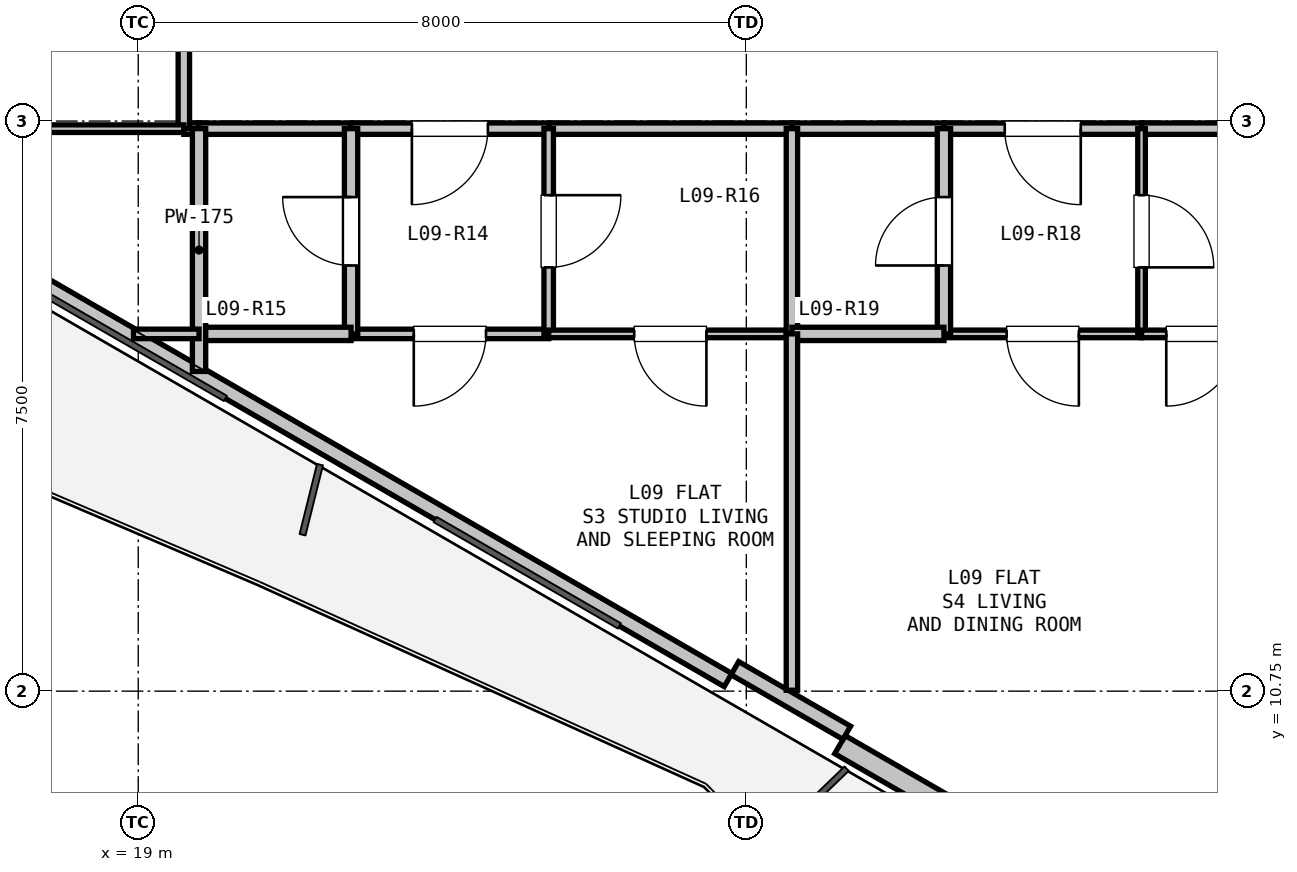
"""IFC4 building model, lengths in metres.
Left out: names, types, materials, properties, quantities, classifications, styles, units other than length and angle.
Written with IfcOpenShell. Run it as: python <this file> out.ifc"""

import sys

from ifc_helpers import new_model, si_unit, direction, frame, frame_2d, origin, place, context, subcontext, project, spatial, rectangle, extrude, element, fill, save


model = new_model("IFC4")
c1 = context("Model", 3, precision=1e-05, world=origin(), true_north=direction((0.0, 1.0)))
c2 = subcontext(c1, "Body", "Model", "MODEL_VIEW")
j1 = project(units=[si_unit("LENGTHUNIT", "METRE"), si_unit("PLANEANGLEUNIT", "RADIAN")], contexts=[c1])
p1 = place(None, origin())
s1 = spatial("IfcSite", under=j1, at=p1, CompositionType="ELEMENT")
p2 = place(p1, origin())
s2 = spatial("IfcBuilding", under=s1, at=p2, CompositionType="ELEMENT")
p3 = place(p2, frame((0.0, 0.0, 35.7)))
s3 = spatial("IfcBuildingStorey", under=s2, at=p3, CompositionType="ELEMENT", Elevation=35.7)
p4 = place(p3, frame((39.207, 3.71, 0.0), z_axis=(0.0, 0.0, 1.0), x_axis=(-0.86603192154, 0.499988710747, 0.0)))
e1 = element("IfcWall", 1, at=p4, inside=s3, PredefinedType="SOLIDWALL", context=c2, shape_type="SweptSolid", body=[
    extrude(rectangle(XDim=12.673, YDim=0.275, at=frame_2d((6.336, 0.0))), origin(), (0.0, 0.0, 1.0), 2.66),
])
p5 = place(p4, frame((8.136, 0.0, 0.0)))
e2 = element("IfcOpeningElement", 2, at=p5, cuts=e1, PredefinedType="OPENING", context=c2, shape_type="SweptSolid", body=[
    extrude(rectangle(XDim=1.0, YDim=2.1, at=frame_2d((0.5, 1.05))), frame((0.0, 0.147, 0.0), z_axis=(0.0, -1.0, 0.0), x_axis=(1.0, 0.0, 0.0)), (0.0, 0.0, 1.0), 0.295),
])
p6 = place(p4, frame((2.971, 0.0, 0.9)))
e3 = element("IfcOpeningElement", 3, at=p6, cuts=e1, PredefinedType="OPENING", context=c2, shape_type="SweptSolid", body=[
    extrude(rectangle(XDim=1.2, YDim=1.4, at=frame_2d((0.6, 0.7))), frame((0.0, 0.147, 0.0), z_axis=(0.0, -1.0, 0.0), x_axis=(1.0, 0.0, 0.0)), (0.0, 0.0, 1.0), 0.295),
])
p7 = place(p3, frame((26.76, 10.896, 0.0), z_axis=(0.0, 0.0, 1.0), x_axis=(-0.866027351828, 0.499996625875, 0.0)))
e4 = element("IfcWall", 4, at=p7, inside=s3, PredefinedType="PARAPET", context=c2, shape_type="SweptSolid", body=[
    extrude(rectangle(XDim=11.973, YDim=0.2, at=frame_2d((5.987, 0.0))), origin(), (0.0, 0.0, 1.0), 0.2),
])
p8 = place(p3, frame((28.322, 10.202, 0.0), z_axis=(0.0, 0.0, 1.0), x_axis=(-0.86605165483, 0.499954529098, 0.0)))
e5 = element("IfcWall", 5, at=p8, inside=s3, PredefinedType="PARAPET", context=c2, shape_type="SweptSolid", body=[
    extrude(rectangle(XDim=1.7, YDim=0.2, at=frame_2d((0.85, 0.0))), origin(), (0.0, 0.0, 1.0), 2.66),
])
p9 = place(p3, frame((35.8, 18.15, 0.0), z_axis=(0.0, 0.0, 1.0), x_axis=(-1.0, 0.0, 0.0)))
e6 = element("IfcWall", 6, at=p9, inside=s3, PredefinedType="PARTITIONING", context=c2, shape_type="SweptSolid", body=[
    extrude(rectangle(XDim=3.6, YDim=0.15, at=frame_2d((1.8, 0.0))), origin(), (0.0, 0.0, 1.0), 3.04),
])
p10 = place(p3, frame((32.2, 18.15, 0.0), z_axis=(0.0, 0.0, 1.0), x_axis=(-1.0, 0.0, 0.0)))
e7 = element("IfcWall", 7, at=p10, inside=s3, PredefinedType="PARTITIONING", context=c2, shape_type="SweptSolid", body=[
    extrude(rectangle(XDim=2.6, YDim=0.15, at=frame_2d((1.3, 0.0))), origin(), (0.0, 0.0, 1.0), 3.04),
])
p11 = place(p10, frame((0.8, 0.0, 0.0)))
e8 = element("IfcOpeningElement", 8, at=p11, cuts=e7, PredefinedType="OPENING", context=c2, shape_type="SweptSolid", body=[
    extrude(rectangle(XDim=1.0, YDim=2.15, at=frame_2d((0.5, 1.075))), frame((0.0, 0.085, 0.0), z_axis=(0.0, -1.0, 0.0), x_axis=(1.0, 0.0, 0.0)), (0.0, 0.0, 1.0), 0.17),
])
p12 = place(p3, frame((29.6, 18.15, 0.0), z_axis=(0.0, 0.0, 1.0), x_axis=(-1.0, 0.0, 0.0)))
e9 = element("IfcWall", 9, at=p12, inside=s3, PredefinedType="PARTITIONING", context=c2, shape_type="SweptSolid", body=[
    extrude(rectangle(XDim=2.0, YDim=0.15, at=frame_2d((1.0, 0.0))), origin(), (0.0, 0.0, 1.0), 3.04),
])
p13 = place(p3, frame((27.6, 18.15, 0.0), z_axis=(0.0, 0.0, 1.0), x_axis=(-1.0, 0.0, 0.0)))
e10 = element("IfcWall", 10, at=p13, inside=s3, PredefinedType="PARTITIONING", context=c2, shape_type="SweptSolid", body=[
    extrude(rectangle(XDim=3.2, YDim=0.15, at=frame_2d((1.6, 0.0))), origin(), (0.0, 0.0, 1.0), 3.04),
])
p14 = place(p3, frame((24.4, 18.15, 0.0), z_axis=(0.0, 0.0, 1.0), x_axis=(-1.0, 0.0, 0.0)))
e11 = element("IfcWall", 11, at=p14, inside=s3, PredefinedType="PARTITIONING", context=c2, shape_type="SweptSolid", body=[
    extrude(rectangle(XDim=2.6, YDim=0.15, at=frame_2d((1.3, 0.0))), origin(), (0.0, 0.0, 1.0), 2.338),
])
p15 = place(p14, frame((0.8, 0.0, 0.0)))
e12 = element("IfcOpeningElement", 12, at=p15, cuts=e11, PredefinedType="OPENING", context=c2, shape_type="SweptSolid", body=[
    extrude(rectangle(XDim=1.0, YDim=2.15, at=frame_2d((0.5, 1.075))), frame((0.0, 0.085, 0.0), z_axis=(0.0, -1.0, 0.0), x_axis=(1.0, 0.0, 0.0)), (0.0, 0.0, 1.0), 0.17),
])
p16 = place(p3, frame((21.8, 18.15, 0.0), z_axis=(0.0, 0.0, 1.0), x_axis=(-1.0, 0.0, 0.0)))
e13 = element("IfcWall", 13, at=p16, inside=s3, PredefinedType="PARTITIONING", context=c2, shape_type="SweptSolid", body=[
    extrude(rectangle(XDim=2.0, YDim=0.15, at=frame_2d((1.0, 0.0))), origin(), (0.0, 0.0, 1.0), 3.04),
])
p17 = place(p3, frame((19.8, 18.15, 0.0), z_axis=(0.0, 0.0, 1.0), x_axis=(-1.0, 0.0, 0.0)))
e14 = element("IfcWall", 14, at=p17, inside=s3, PredefinedType="PARTITIONING", context=c2, shape_type="SweptSolid", body=[
    extrude(rectangle(XDim=0.2, YDim=0.15, at=frame_2d((0.1, 0.0))), origin(), (0.0, 0.0, 1.0), 3.04),
])
p18 = place(p3, frame((19.6, 18.15, 0.0), z_axis=(0.0, 0.0, 1.0), x_axis=(0.0, 1.0, 0.0)))
e15 = element("IfcWall", 15, at=p18, inside=s3, PredefinedType="PARTITIONING", context=c2, shape_type="SweptSolid", body=[
    extrude(rectangle(XDim=3.9, YDim=0.15, at=frame_2d((1.95, 0.0))), origin(), (0.0, 0.0, 1.0), 2.338),
])
p19 = place(p3, frame((24.4, 15.45, 0.0), z_axis=(0.0, 0.0, 1.0), x_axis=(-1.0, 0.0, 0.0)))
e16 = element("IfcWall", 16, at=p19, inside=s3, PredefinedType="PARTITIONING", context=c2, shape_type="SweptSolid", body=[
    extrude(rectangle(XDim=2.6, YDim=0.125, at=frame_2d((1.3, 0.0))), origin(), (0.0, 0.0, 1.0), 3.04),
])
p20 = place(p19, frame((0.825, 0.0, 0.0)))
e17 = element("IfcOpeningElement", 17, at=p20, cuts=e16, PredefinedType="OPENING", context=c2, shape_type="SweptSolid", body=[
    extrude(rectangle(XDim=0.95, YDim=2.1, at=frame_2d((0.475, 1.05))), frame((0.0, 0.073, 0.0), z_axis=(0.0, -1.0, 0.0), x_axis=(1.0, 0.0, 0.0)), (0.0, 0.0, 1.0), 0.145),
])
p21 = place(p3, frame((21.8, 15.45, 0.0), z_axis=(0.0, 0.0, 1.0), x_axis=(0.0, 1.0, 0.0)))
e18 = element("IfcWall", 18, at=p21, inside=s3, PredefinedType="PLUMBINGWALL", context=c2, shape_type="SweptSolid", body=[
    extrude(rectangle(XDim=2.7, YDim=0.175, at=frame_2d((1.35, 0.0))), origin(), (0.0, 0.0, 1.0), 3.04),
])
p22 = place(p21, frame((0.9, 0.0, 0.0)))
e19 = element("IfcOpeningElement", 19, at=p22, cuts=e18, PredefinedType="OPENING", context=c2, shape_type="SweptSolid", body=[
    extrude(rectangle(XDim=0.9, YDim=2.1, at=frame_2d((0.45, 1.05))), frame((0.0, 0.097, 0.0), z_axis=(0.0, -1.0, 0.0), x_axis=(1.0, 0.0, 0.0)), (0.0, 0.0, 1.0), 0.195),
])
p23 = place(p3, frame((24.4, 18.15, 0.0), z_axis=(0.0, 0.0, 1.0), x_axis=(0.0, -1.0, 0.0)))
e20 = element("IfcWall", 20, at=p23, inside=s3, PredefinedType="PARTITIONING", context=c2, shape_type="SweptSolid", body=[
    extrude(rectangle(XDim=2.7, YDim=0.125, at=frame_2d((1.35, 0.0))), origin(), (0.0, 0.0, 1.0), 2.338),
])
p24 = place(p23, frame((0.875, 0.0, 0.0)))
e21 = element("IfcOpeningElement", 21, at=p24, cuts=e20, PredefinedType="OPENING", context=c2, shape_type="SweptSolid", body=[
    extrude(rectangle(XDim=0.95, YDim=2.1, at=frame_2d((0.475, 1.05))), frame((0.0, 0.073, 0.0), z_axis=(0.0, -1.0, 0.0), x_axis=(1.0, 0.0, 0.0)), (0.0, 0.0, 1.0), 0.145),
])
p25 = place(p3, frame((32.2, 15.45, 0.0), z_axis=(0.0, 0.0, 1.0), x_axis=(-1.0, 0.0, 0.0)))
e22 = element("IfcWall", 22, at=p25, inside=s3, PredefinedType="PARTITIONING", context=c2, shape_type="SweptSolid", body=[
    extrude(rectangle(XDim=2.6, YDim=0.1, at=frame_2d((1.3, 0.0))), origin(), (0.0, 0.0, 1.0), 3.04),
])
p26 = place(p25, frame((0.825, 0.0, 0.0)))
e23 = element("IfcOpeningElement", 23, at=p26, cuts=e22, PredefinedType="OPENING", context=c2, shape_type="SweptSolid", body=[
    extrude(rectangle(XDim=0.95, YDim=2.1, at=frame_2d((0.475, 1.05))), frame((0.0, 0.06, 0.0), z_axis=(0.0, -1.0, 0.0), x_axis=(1.0, 0.0, 0.0)), (0.0, 0.0, 1.0), 0.12),
])
p27 = place(p3, frame((29.6, 15.45, 0.0), z_axis=(0.0, 0.0, 1.0), x_axis=(0.0, 1.0, 0.0)))
e24 = element("IfcWall", 24, at=p27, inside=s3, PredefinedType="PLUMBINGWALL", context=c2, shape_type="SweptSolid", body=[
    extrude(rectangle(XDim=2.7, YDim=0.175, at=frame_2d((1.35, 0.0))), origin(), (0.0, 0.0, 1.0), 3.04),
])
p28 = place(p27, frame((0.9, 0.0, 0.0)))
e25 = element("IfcOpeningElement", 25, at=p28, cuts=e24, PredefinedType="OPENING", context=c2, shape_type="SweptSolid", body=[
    extrude(rectangle(XDim=0.9, YDim=2.1, at=frame_2d((0.45, 1.05))), frame((0.0, 0.097, 0.0), z_axis=(0.0, -1.0, 0.0), x_axis=(1.0, 0.0, 0.0)), (0.0, 0.0, 1.0), 0.195),
])
p29 = place(p3, frame((32.2, 18.15, 0.0), z_axis=(0.0, 0.0, 1.0), x_axis=(0.0, -1.0, 0.0)))
e26 = element("IfcWall", 26, at=p29, inside=s3, PredefinedType="PARTITIONING", context=c2, shape_type="SweptSolid", body=[
    extrude(rectangle(XDim=2.7, YDim=0.1, at=frame_2d((1.35, 0.0))), origin(), (0.0, 0.0, 1.0), 3.04),
])
p30 = place(p29, frame((0.875, 0.0, 0.0)))
e27 = element("IfcOpeningElement", 27, at=p30, cuts=e26, PredefinedType="OPENING", context=c2, shape_type="SweptSolid", body=[
    extrude(rectangle(XDim=0.95, YDim=2.1, at=frame_2d((0.475, 1.05))), frame((0.0, 0.06, 0.0), z_axis=(0.0, -1.0, 0.0), x_axis=(1.0, 0.0, 0.0)), (0.0, 0.0, 1.0), 0.12),
])
p31 = place(p3, frame((21.8, 15.45, 0.0), z_axis=(0.0, 0.0, 1.0), x_axis=(-1.0, 0.0, 0.0)))
e28 = element("IfcWall", 28, at=p31, inside=s3, PredefinedType="PLUMBINGWALL", context=c2, shape_type="SweptSolid", body=[
    extrude(rectangle(XDim=2.0, YDim=0.175, at=frame_2d((1.0, 0.0))), origin(), (0.0, 0.0, 1.0), 2.365),
])
p32 = place(p3, frame((19.8, 14.956, 0.0), z_axis=(0.0, 0.0, 1.0), x_axis=(0.0, 1.0, 0.0)))
e29 = element("IfcWall", 29, at=p32, inside=s3, PredefinedType="PLUMBINGWALL", context=c2, shape_type="SweptSolid", body=[
    extrude(rectangle(XDim=3.194, YDim=0.175, at=frame_2d((1.597, 0.0))), origin(), (0.0, 0.0, 1.0), 2.365),
])
p33 = place(p3, frame((27.6, 15.45, 0.0), z_axis=(0.0, 0.0, 1.0), x_axis=(-1.0, 0.0, 0.0)))
e30 = element("IfcWall", 30, at=p33, inside=s3, PredefinedType="PARTITIONING", context=c2, shape_type="SweptSolid", body=[
    extrude(rectangle(XDim=3.2, YDim=0.1, at=frame_2d((1.6, 0.0))), origin(), (0.0, 0.0, 1.0), 2.338),
])
p34 = place(p33, frame((1.125, 0.0, 0.0)))
e31 = element("IfcOpeningElement", 31, at=p34, cuts=e30, PredefinedType="OPENING", context=c2, shape_type="SweptSolid", body=[
    extrude(rectangle(XDim=0.95, YDim=2.1, at=frame_2d((0.475, 1.05))), frame((0.0, 0.06, 0.0), z_axis=(0.0, -1.0, 0.0), x_axis=(1.0, 0.0, 0.0)), (0.0, 0.0, 1.0), 0.12),
])
p35 = place(p3, frame((27.6, 18.15, 0.0), z_axis=(0.0, 0.0, 1.0), x_axis=(0.0, -1.0, 0.0)))
e32 = element("IfcWall", 32, at=p35, inside=s3, PredefinedType="PARTITIONING", context=c2, shape_type="SweptSolid", body=[
    extrude(rectangle(XDim=2.7, YDim=0.15, at=frame_2d((1.35, 0.0))), origin(), (0.0, 0.0, 1.0), 3.04),
])
p36 = place(p3, frame((29.6, 15.45, 0.0), z_axis=(0.0, 0.0, 1.0), x_axis=(-1.0, 0.0, 0.0)))
e33 = element("IfcWall", 33, at=p36, inside=s3, PredefinedType="PLUMBINGWALL", context=c2, shape_type="SweptSolid", body=[
    extrude(rectangle(XDim=2.0, YDim=0.175, at=frame_2d((1.0, 0.0))), origin(), (0.0, 0.0, 1.0), 3.04),
])
p37 = place(p3, frame((33.8, 15.45, 0.0), z_axis=(0.0, 0.0, 1.0), x_axis=(-1.0, 0.0, 0.0)))
e34 = element("IfcWall", 34, at=p37, inside=s3, PredefinedType="PARTITIONING", context=c2, shape_type="SweptSolid", body=[
    extrude(rectangle(XDim=1.6, YDim=0.1, at=frame_2d((0.8, 0.0))), origin(), (0.0, 0.0, 1.0), 3.04),
])
p38 = place(p37, frame((0.325, 0.0, 0.0)))
e35 = element("IfcOpeningElement", 35, at=p38, cuts=e34, PredefinedType="OPENING", context=c2, shape_type="SweptSolid", body=[
    extrude(rectangle(XDim=0.95, YDim=2.1, at=frame_2d((0.475, 1.05))), frame((0.0, 0.06, 0.0), z_axis=(0.0, -1.0, 0.0), x_axis=(1.0, 0.0, 0.0)), (0.0, 0.0, 1.0), 0.12),
])
p39 = place(p3, frame((19.6, 18.15, 0.0), z_axis=(0.0, 0.0, 1.0), x_axis=(-1.0, 0.0, 0.0)))
e36 = element("IfcWall", 36, at=p39, inside=s3, PredefinedType="PARTITIONING", context=c2, shape_type="SweptSolid", body=[
    extrude(rectangle(XDim=2.45, YDim=0.1, at=frame_2d((1.225, 0.0))), origin(), (0.0, 0.0, 1.0), 3.04),
])
p40 = place(p3, frame((18.938, 15.45, 0.0), z_axis=(0.0, 0.0, 1.0), x_axis=(1.0, 0.0, 0.0)))
e37 = element("IfcWall", 37, at=p40, inside=s3, PredefinedType="PARTITIONING", context=c2, shape_type="SweptSolid", body=[
    extrude(rectangle(XDim=0.863, YDim=0.125, at=frame_2d((0.431, 0.0))), origin(), (0.0, 0.0, 1.0), 2.65),
])
p41 = place(p3, frame((27.6, 15.45, 0.0), z_axis=(0.0, 0.0, 1.0), x_axis=(0.0, -1.0, 0.0)))
e38 = element("IfcWall", 38, at=p41, inside=s3, PredefinedType="PARTITIONING", context=c2, shape_type="SweptSolid", body=[
    extrude(rectangle(XDim=4.688, YDim=0.15, at=frame_2d((2.344, 0.0))), origin(), (0.0, 0.0, 1.0), 2.338),
])
p42 = place(p15, origin())
e39 = element("IfcDoor", 39, at=p42, inside=s3, OperationType="SINGLE_SWING_RIGHT", PredefinedType="DOOR", context=c2, shape_type="SweptSolid", body=[
    extrude(rectangle(XDim=1.0, YDim=2.15, at=frame_2d((0.5, 1.075))), frame((0.0, 0.025, 0.0), z_axis=(0.0, -1.0, 0.0), x_axis=(1.0, 0.0, 0.0)), (0.0, 0.0, 1.0), 0.05),
])
fill(e12, e39)
p43 = place(p11, origin())
e40 = element("IfcDoor", 40, at=p43, inside=s3, OperationType="SINGLE_SWING_LEFT", PredefinedType="DOOR", context=c2, shape_type="SweptSolid", body=[
    extrude(rectangle(XDim=1.0, YDim=2.15, at=frame_2d((0.5, 1.075))), frame((0.0, 0.025, 0.0), z_axis=(0.0, -1.0, 0.0), x_axis=(1.0, 0.0, 0.0)), (0.0, 0.0, 1.0), 0.05),
])
fill(e8, e40)
p44 = place(p22, origin())
e41 = element("IfcDoor", 41, at=p44, inside=s3, OperationType="SINGLE_SWING_RIGHT", PredefinedType="DOOR", context=c2, shape_type="SweptSolid", body=[
    extrude(rectangle(XDim=0.9, YDim=2.1, at=frame_2d((0.45, 1.05))), frame((0.0, 0.025, 0.0), z_axis=(0.0, -1.0, 0.0), x_axis=(1.0, 0.0, 0.0)), (0.0, 0.0, 1.0), 0.05),
])
fill(e19, e41)
p45 = place(p24, origin())
e42 = element("IfcDoor", 42, at=p45, inside=s3, OperationType="SINGLE_SWING_LEFT", PredefinedType="DOOR", context=c2, shape_type="SweptSolid", body=[
    extrude(rectangle(XDim=0.95, YDim=2.1, at=frame_2d((0.475, 1.05))), frame((0.0, 0.025, 0.0), z_axis=(0.0, -1.0, 0.0), x_axis=(1.0, 0.0, 0.0)), (0.0, 0.0, 1.0), 0.05),
])
fill(e21, e42)
p46 = place(p20, origin())
e43 = element("IfcDoor", 43, at=p46, inside=s3, OperationType="SINGLE_SWING_RIGHT", PredefinedType="DOOR", context=c2, shape_type="SweptSolid", body=[
    extrude(rectangle(XDim=0.95, YDim=2.1, at=frame_2d((0.475, 1.05))), frame((0.0, 0.025, 0.0), z_axis=(0.0, -1.0, 0.0), x_axis=(1.0, 0.0, 0.0)), (0.0, 0.0, 1.0), 0.05),
])
fill(e17, e43)
p47 = place(p28, origin())
e44 = element("IfcDoor", 44, at=p47, inside=s3, OperationType="SINGLE_SWING_LEFT", PredefinedType="DOOR", context=c2, shape_type="SweptSolid", body=[
    extrude(rectangle(XDim=0.9, YDim=2.1, at=frame_2d((0.45, 1.05))), frame((0.0, 0.025, 0.0), z_axis=(0.0, -1.0, 0.0), x_axis=(1.0, 0.0, 0.0)), (0.0, 0.0, 1.0), 0.05),
])
fill(e25, e44)
p48 = place(p30, origin())
e45 = element("IfcDoor", 45, at=p48, inside=s3, OperationType="SINGLE_SWING_RIGHT", PredefinedType="DOOR", context=c2, shape_type="SweptSolid", body=[
    extrude(rectangle(XDim=0.95, YDim=2.1, at=frame_2d((0.475, 1.05))), frame((0.0, 0.025, 0.0), z_axis=(0.0, -1.0, 0.0), x_axis=(1.0, 0.0, 0.0)), (0.0, 0.0, 1.0), 0.05),
])
fill(e27, e45)
p49 = place(p26, origin())
e46 = element("IfcDoor", 46, at=p49, inside=s3, OperationType="SINGLE_SWING_LEFT", PredefinedType="DOOR", context=c2, shape_type="SweptSolid", body=[
    extrude(rectangle(XDim=0.95, YDim=2.1, at=frame_2d((0.475, 1.05))), frame((0.0, 0.025, 0.0), z_axis=(0.0, -1.0, 0.0), x_axis=(1.0, 0.0, 0.0)), (0.0, 0.0, 1.0), 0.05),
])
fill(e23, e46)
p50 = place(p34, origin())
e47 = element("IfcDoor", 47, at=p50, inside=s3, OperationType="SINGLE_SWING_LEFT", PredefinedType="DOOR", context=c2, shape_type="SweptSolid", body=[
    extrude(rectangle(XDim=0.95, YDim=2.1, at=frame_2d((0.475, 1.05))), frame((0.0, 0.025, 0.0), z_axis=(0.0, -1.0, 0.0), x_axis=(1.0, 0.0, 0.0)), (0.0, 0.0, 1.0), 0.05),
])
fill(e31, e47)
p51 = place(p38, origin())
e48 = element("IfcDoor", 48, at=p51, inside=s3, OperationType="SINGLE_SWING_RIGHT", PredefinedType="DOOR", context=c2, shape_type="SweptSolid", body=[
    extrude(rectangle(XDim=0.95, YDim=2.1, at=frame_2d((0.475, 1.05))), frame((0.0, 0.025, 0.0), z_axis=(0.0, -1.0, 0.0), x_axis=(1.0, 0.0, 0.0)), (0.0, 0.0, 1.0), 0.05),
])
fill(e35, e48)
save(model, sys.argv[1])
